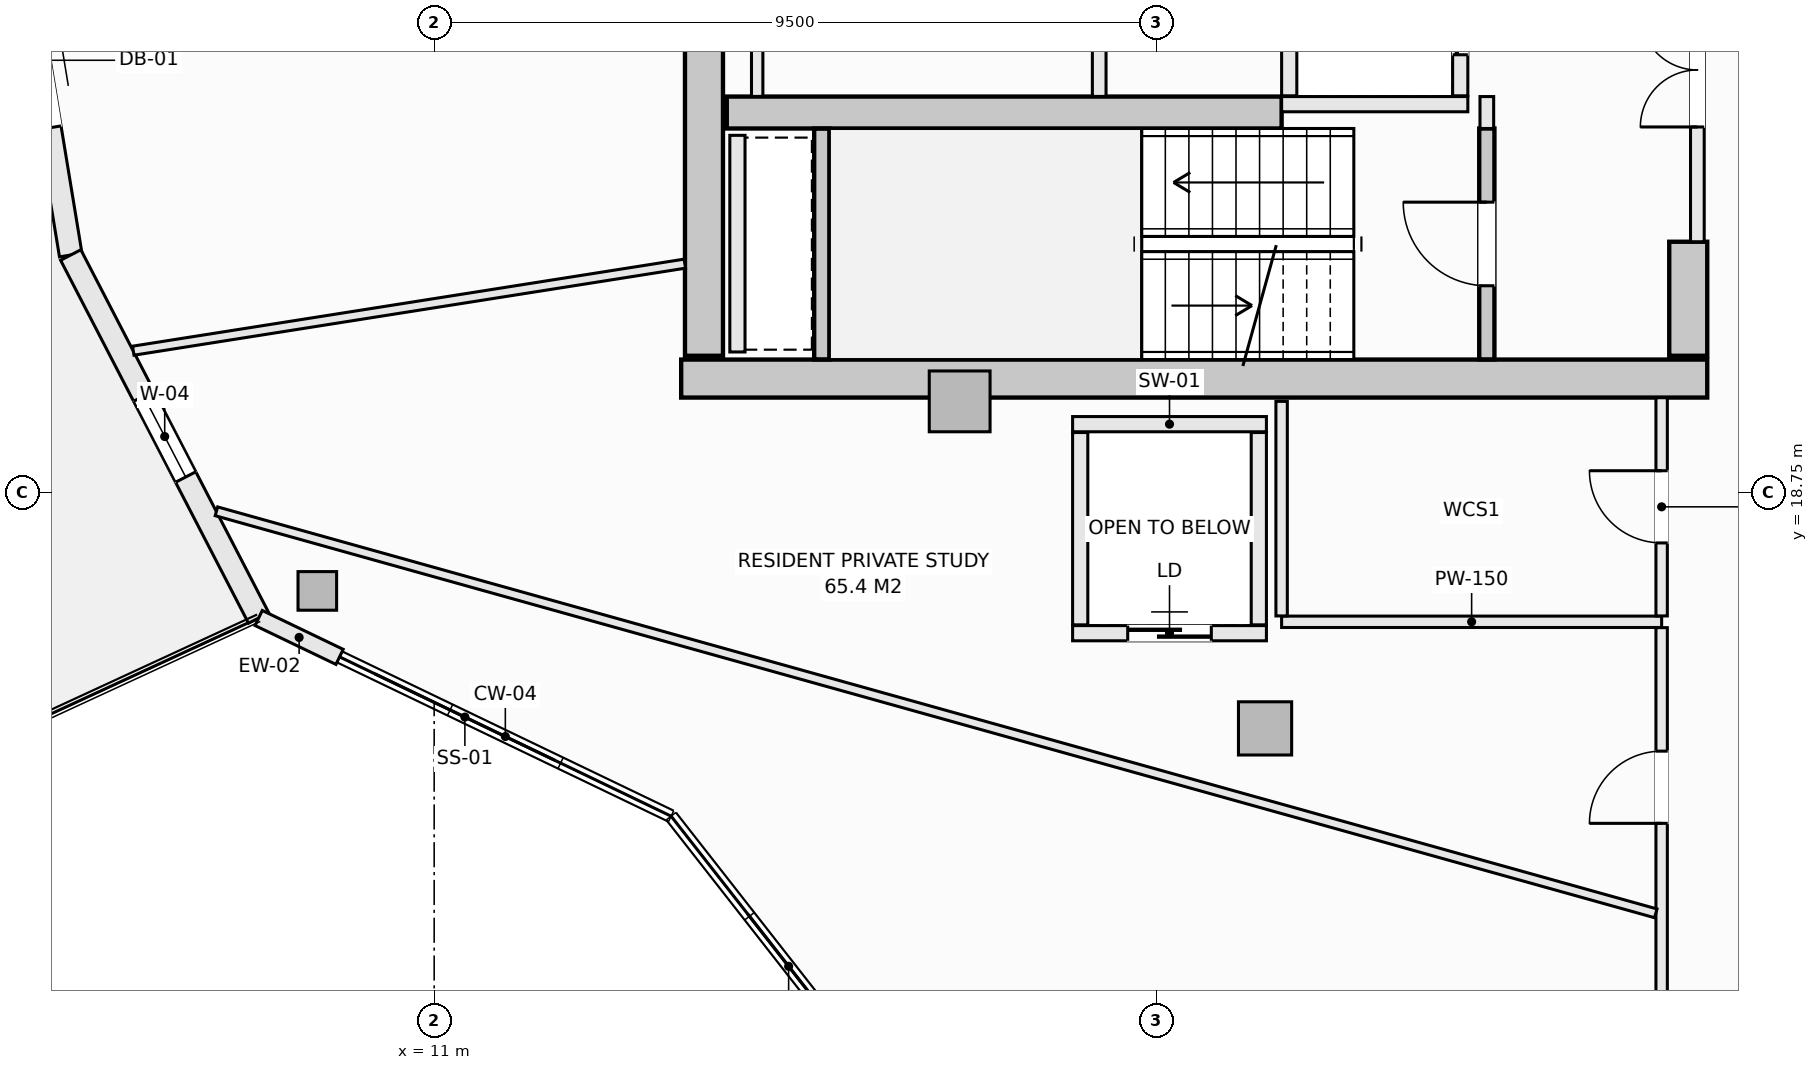
"""IFC4 building model, lengths in metres.
Left out: names, types, materials, properties, quantities, classifications, styles, units other than length and angle.
Written with IfcOpenShell. Run it as: python <this file> out.ifc"""

import sys

from ifc_helpers import new_model, si_unit, direction, frame, frame_2d, origin, origin_2d, place, context, subcontext, project, spatial, rectangle, hollow_rectangle, extrude, element, fill, save


model = new_model("IFC4")
c1 = context("Model", 3, precision=1e-05, world=origin(), true_north=direction((0.0, 1.0)))
c2 = subcontext(c1, "Body", "Model", "MODEL_VIEW")
j1 = project(units=[si_unit("LENGTHUNIT", "METRE"), si_unit("PLANEANGLEUNIT", "RADIAN")], contexts=[c1])
p1 = place(None, origin())
s1 = spatial("IfcSite", under=j1, at=p1, CompositionType="ELEMENT")
p2 = place(p1, origin())
s2 = spatial("IfcBuilding", under=s1, at=p2, CompositionType="ELEMENT")
p3 = place(p2, frame((0.0, 0.0, 219.5)))
s3 = spatial("IfcBuildingStorey", under=s2, at=p3, CompositionType="ELEMENT", Elevation=219.5)
p4 = place(p3, frame((14.25, 20.25, -0.27), z_axis=(0.0, 0.0, 1.0), x_axis=(1.0, 0.0, 0.0)))
e1 = element("IfcWall", 1, at=p4, inside=s3, PredefinedType="SHEAR", context=c2, shape_type="SweptSolid", body=[
    extrude(rectangle(XDim=13.5, YDim=0.5, at=frame_2d((6.75, 0.0))), origin(), (0.0, 0.0, 1.0), 3.3),
])
p5 = place(p3, frame((14.55, 20.55, -0.27), z_axis=(0.0, 0.0, 1.0), x_axis=(0.0, 1.0, 0.0)))
e2 = element("IfcWall", 2, at=p5, inside=s3, PredefinedType="SHEAR", context=c2, shape_type="SweptSolid", body=[
    extrude(rectangle(XDim=12.9, YDim=0.5, at=frame_2d((6.45, 0.0))), origin(), (0.0, 0.0, 1.0), 3.3),
])
p6 = place(p3, frame((27.5, 20.55, -0.27), z_axis=(0.0, 0.0, 1.0), x_axis=(0.0, 1.0, 0.0)))
e3 = element("IfcWall", 3, at=p6, inside=s3, PredefinedType="SHEAR", context=c2, shape_type="SweptSolid", body=[
    extrude(rectangle(XDim=1.5, YDim=0.5, at=frame_2d((0.75, 0.0))), origin(), (0.0, 0.0, 1.0), 3.3),
])
p7 = place(p3, frame((14.85, 23.75, -0.27), z_axis=(0.0, 0.0, 1.0), x_axis=(1.0, 0.0, 0.0)))
e4 = element("IfcWall", 4, at=p7, inside=s3, PredefinedType="SHEAR", context=c2, shape_type="SweptSolid", body=[
    extrude(rectangle(XDim=7.3, YDim=0.42, at=frame_2d((3.65, 0.0))), origin(), (0.0, 0.0, 1.0), 3.3),
])
p8 = place(p3, frame((9.463, 17.456, -0.27), z_axis=(0.0, 0.0, 1.0), x_axis=(1.0, 0.0, 0.0)))
e5 = element("IfcColumn", 5, at=p8, inside=s3, PredefinedType="COLUMN", context=c2, shape_type="SweptSolid", body=[
    extrude(hollow_rectangle(XDim=0.508, YDim=0.508, WallThickness=0.019, at=origin_2d()), origin(), (0.0, 0.0, 1.0), 3.3),
])
p9 = place(p3, frame((21.932, 15.648, -0.27), z_axis=(0.0, 0.0, 1.0), x_axis=(1.0, 0.0, 0.0)))
e6 = element("IfcColumn", 6, at=p9, inside=s3, PredefinedType="COLUMN", context=c2, shape_type="SweptSolid", body=[
    extrude(rectangle(XDim=0.7, YDim=0.7, at=origin_2d()), origin(), (0.0, 0.0, 1.0), 3.3),
])
p10 = place(p3, frame((17.914, 19.95, -0.27), z_axis=(0.0, 0.0, 1.0), x_axis=(1.0, 0.0, 0.0)))
e7 = element("IfcColumn", 7, at=p10, inside=s3, PredefinedType="PILASTER", context=c2, shape_type="SweptSolid", body=[
    extrude(rectangle(XDim=0.8, YDim=0.8, at=origin_2d()), origin(), (0.0, 0.0, 1.0), 3.3),
])
p11 = place(p3, frame((5.375, 27.0, 0.0), z_axis=(0.0, 0.0, 1.0), x_axis=(0.16237087798, -0.986729799886, 0.0)))
e8 = element("IfcWall", 8, at=p11, inside=s3, PredefinedType="SOLIDWALL", context=c2, shape_type="SweptSolid", body=[
    extrude(rectangle(XDim=5.193, YDim=0.3, at=frame_2d((2.597, 0.0))), origin(), (0.0, 0.0, 1.0), 2.605),
])
p12 = place(p11, frame((1.697, 0.0, 0.0)))
e9 = element("IfcOpeningElement", 9, at=p12, cuts=e8, PredefinedType="OPENING", context=c2, shape_type="SweptSolid", body=[
    extrude(rectangle(XDim=1.8, YDim=2.25, at=frame_2d((0.9, 1.125))), frame((0.0, 0.16, 0.0), z_axis=(0.0, -1.0, 0.0), x_axis=(1.0, 0.0, 0.0)), (0.0, 0.0, 1.0), 0.32),
])
p13 = place(p3, frame((6.218, 21.875, 0.0), z_axis=(0.0, 0.0, 1.0), x_axis=(0.459808219482, -0.888018243786, 0.0)))
e10 = element("IfcWall", 10, at=p13, inside=s3, PredefinedType="SOLIDWALL", context=c2, shape_type="SweptSolid", body=[
    extrude(rectangle(XDim=5.378, YDim=0.3, at=frame_2d((2.689, 0.0))), origin(), (0.0, 0.0, 1.0), 2.605),
])
p14 = place(p13, frame((2.089, 0.0, 0.72)))
e11 = element("IfcOpeningElement", 11, at=p14, cuts=e10, PredefinedType="OPENING", context=c2, shape_type="SweptSolid", body=[
    extrude(rectangle(XDim=1.2, YDim=1.65, at=frame_2d((0.6, 0.825))), frame((0.0, 0.16, 0.0), z_axis=(0.0, -1.0, 0.0), x_axis=(1.0, 0.0, 0.0)), (0.0, 0.0, 1.0), 0.32),
])
p15 = place(p3, frame((8.691, 17.1, 0.0), z_axis=(0.0, 0.0, 1.0), x_axis=(0.901264843027, -0.433268603437, 0.0)))
e12 = element("IfcWall", 12, at=p15, inside=s3, PredefinedType="SOLIDWALL", context=c2, shape_type="SweptSolid", body=[
    extrude(rectangle(XDim=1.181, YDim=0.22, at=frame_2d((0.591, 0.0))), origin(), (0.0, 0.0, 1.0), 2.605),
])
p16 = place(p3, frame((24.85, 20.502, -0.27), z_axis=(0.0, 0.0, 1.0), x_axis=(0.0, 1.0, 0.0)))
e13 = element("IfcWall", 13, at=p16, inside=s3, PredefinedType="SHEAR", context=c2, shape_type="SweptSolid", body=[
    extrude(rectangle(XDim=3.038, YDim=0.2, at=frame_2d((1.519, 0.0))), origin(), (0.0, 0.0, 1.0), 3.3),
])
p17 = place(p16, frame((0.969, 0.0, 0.27)))
e14 = element("IfcOpeningElement", 14, at=p17, cuts=e13, PredefinedType="OPENING", context=c2, shape_type="SweptSolid", body=[
    extrude(rectangle(XDim=1.1, YDim=2.15, at=frame_2d((0.55, 1.075))), frame((0.0, 0.11, 0.0), z_axis=(0.0, -1.0, 0.0), x_axis=(1.0, 0.0, 0.0)), (0.0, 0.0, 1.0), 0.22),
])
p18 = place(p3, frame((16.1, 20.502, -0.27), z_axis=(0.0, 0.0, 1.0), x_axis=(0.0, 1.0, 0.0)))
e15 = element("IfcWall", 15, at=p18, inside=s3, PredefinedType="SHEAR", context=c2, shape_type="SweptSolid", body=[
    extrude(rectangle(XDim=3.036, YDim=0.2, at=frame_2d((1.518, 0.0))), origin(), (0.0, 0.0, 1.0), 3.3),
])
p19 = place(p3, frame((22.15, 23.86, 0.0), z_axis=(0.0, 0.0, 1.0), x_axis=(1.0, 0.0, 0.0)))
e16 = element("IfcWall", 16, at=p19, inside=s3, PredefinedType="SOLIDWALL", context=c2, shape_type="SweptSolid", body=[
    extrude(rectangle(XDim=2.45, YDim=0.2, at=frame_2d((1.225, 0.0))), origin(), (0.0, 0.0, 1.0), 3.03),
])
p20 = place(p3, frame((22.25, 23.97, 0.0), z_axis=(0.0, 0.0, 1.0), x_axis=(0.0, 1.0, 0.0)))
e17 = element("IfcWall", 17, at=p20, inside=s3, PredefinedType="SOLIDWALL", context=c2, shape_type="SweptSolid", body=[
    extrude(rectangle(XDim=2.18, YDim=0.2, at=frame_2d((1.09, 0.0))), origin(), (0.0, 0.0, 1.0), 3.03),
])
p21 = place(p3, frame((24.5, 23.97, 0.0), z_axis=(0.0, 0.0, 1.0), x_axis=(0.0, 1.0, 0.0)))
e18 = element("IfcWall", 18, at=p21, inside=s3, PredefinedType="SOLIDWALL", context=c2, shape_type="SweptSolid", body=[
    extrude(rectangle(XDim=2.18, YDim=0.2, at=frame_2d((1.09, 0.0))), origin(), (0.0, 0.0, 1.0), 3.03),
])
p22 = place(p21, frame((0.54, 0.0, 0.0)))
e19 = element("IfcOpeningElement", 19, at=p22, cuts=e18, PredefinedType="OPENING", context=c2, shape_type="SweptSolid", body=[
    extrude(rectangle(XDim=1.1, YDim=2.2, at=frame_2d((0.55, 1.1))), frame((0.0, 0.11, 0.0), z_axis=(0.0, -1.0, 0.0), x_axis=(1.0, 0.0, 0.0)), (0.0, 0.0, 1.0), 0.22),
])
p23 = place(p3, frame((19.4, 19.65, 0.0), z_axis=(0.0, 0.0, 1.0), x_axis=(1.0, 0.0, 0.0)))
e20 = element("IfcWall", 20, at=p23, inside=s3, PredefinedType="SOLIDWALL", context=c2, shape_type="SweptSolid", body=[
    extrude(rectangle(XDim=2.55, YDim=0.2, at=frame_2d((1.275, 0.0))), origin(), (0.0, 0.0, 1.0), 3.03),
])
p24 = place(p3, frame((19.4, 16.9, 0.0), z_axis=(0.0, 0.0, 1.0), x_axis=(1.0, 0.0, 0.0)))
e21 = element("IfcWall", 21, at=p24, inside=s3, PredefinedType="SOLIDWALL", context=c2, shape_type="SweptSolid", body=[
    extrude(rectangle(XDim=2.55, YDim=0.2, at=frame_2d((1.275, 0.0))), origin(), (0.0, 0.0, 1.0), 3.03),
])
p25 = place(p24, frame((0.725, 0.0, 0.0)))
e22 = element("IfcOpeningElement", 22, at=p25, cuts=e21, PredefinedType="OPENING", context=c2, shape_type="SweptSolid", body=[
    extrude(rectangle(XDim=1.1, YDim=2.2, at=frame_2d((0.55, 1.1))), frame((0.0, 0.11, 0.0), z_axis=(0.0, -1.0, 0.0), x_axis=(1.0, 0.0, 0.0)), (0.0, 0.0, 1.0), 0.22),
])
for number, where, z_axis, x_axis in (
    (23, (19.5, 17.01, 0.0), (0.0, 0.0, 1.0), (0.0, 1.0, 0.0)),
    (24, (21.85, 17.01, 0.0), (0.0, 0.0, 1.0), (0.0, 1.0, 0.0)),
):
    element("IfcWall", number, at=place(p3, frame(where, z_axis=z_axis, x_axis=x_axis)), inside=s3, PredefinedType="SOLIDWALL", context=c2, shape_type="SweptSolid", body=[
        extrude(rectangle(XDim=2.53, YDim=0.2, at=frame_2d((1.265, 0.0))), origin(), (0.0, 0.0, 1.0), 3.03),
    ])
p26 = place(p3, frame((14.99, 20.6, 0.0), z_axis=(0.0, 0.0, 1.0), x_axis=(0.0, 1.0, 0.0)))
e25 = element("IfcWall", 25, at=p26, inside=s3, PredefinedType="SOLIDWALL", context=c2, shape_type="SweptSolid", body=[
    extrude(rectangle(XDim=2.85, YDim=0.2, at=frame_2d((1.425, 0.0))), origin(), (0.0, 0.0, 1.0), 3.03),
])
p27 = place(p3, frame((24.85, 23.54, 0.0), z_axis=(0.0, 0.0, 1.0), x_axis=(0.0, 1.0, 0.0)))
e26 = element("IfcWall", 26, at=p27, inside=s3, PredefinedType="SOLIDWALL", context=c2, shape_type="SweptSolid", body=[
    extrude(rectangle(XDim=0.42, YDim=0.18, at=frame_2d((0.21, 0.0))), origin(), (0.0, 0.0, 1.0), 3.03),
])
p28 = place(p3, frame((27.62, 22.05, 0.0), z_axis=(0.0, 0.0, 1.0), x_axis=(0.0, 1.0, 0.0)))
e27 = element("IfcWall", 27, at=p28, inside=s3, PredefinedType="SOLIDWALL", context=c2, shape_type="SweptSolid", body=[
    extrude(rectangle(XDim=9.9, YDim=0.18, at=frame_2d((4.95, 0.0))), origin(), (0.0, 0.0, 1.0), 3.03),
])
p29 = place(p28, frame((4.475, 0.0, 0.0)))
e28 = element("IfcOpeningElement", 28, at=p29, cuts=e27, PredefinedType="OPENING", context=c2, shape_type="SweptSolid", body=[
    extrude(rectangle(XDim=0.95, YDim=2.1, at=frame_2d((0.475, 1.05))), frame((0.0, 0.1, 0.0), z_axis=(0.0, -1.0, 0.0), x_axis=(1.0, 0.0, 0.0)), (0.0, 0.0, 1.0), 0.2),
])
p30 = place(p28, frame((6.89, 0.0, 0.0)))
e29 = element("IfcOpeningElement", 29, at=p30, cuts=e27, PredefinedType="OPENING", context=c2, shape_type="SweptSolid", body=[
    extrude(rectangle(XDim=1.5, YDim=2.2, at=frame_2d((0.75, 1.1))), frame((0.0, 0.1, 0.0), z_axis=(0.0, -1.0, 0.0), x_axis=(1.0, 0.0, 0.0)), (0.0, 0.0, 1.0), 0.2),
])
p31 = place(p28, frame((1.51, 0.0, 0.0)))
e30 = element("IfcOpeningElement", 30, at=p31, cuts=e27, PredefinedType="OPENING", context=c2, shape_type="SweptSolid", body=[
    extrude(rectangle(XDim=1.5, YDim=2.2, at=frame_2d((0.75, 1.1))), frame((0.0, 0.1, 0.0), z_axis=(0.0, -1.0, 0.0), x_axis=(1.0, 0.0, 0.0)), (0.0, 0.0, 1.0), 0.2),
])
p32 = place(p3, frame((15.25, 23.962, 0.0), z_axis=(0.0, 0.0, 1.0), x_axis=(0.0, 1.0, 0.0)))
e31 = element("IfcWall", 31, at=p32, inside=s3, PredefinedType="PARTITIONING", context=c2, shape_type="SweptSolid", body=[
    extrude(rectangle(XDim=2.106, YDim=0.15, at=frame_2d((1.053, 0.0))), origin(), (0.0, 0.0, 1.0), 3.03),
])
p33 = place(p3, frame((19.75, 23.962, 0.0), z_axis=(0.0, 0.0, 1.0), x_axis=(0.0, 1.0, 0.0)))
e32 = element("IfcWall", 32, at=p33, inside=s3, PredefinedType="SOLIDWALL", context=c2, shape_type="SweptSolid", body=[
    extrude(rectangle(XDim=2.106, YDim=0.18, at=frame_2d((1.053, 0.0))), origin(), (0.0, 0.0, 1.0), 3.03),
])
p34 = place(p3, frame((22.15, 17.05, 0.0), z_axis=(0.0, 0.0, 1.0), x_axis=(1.0, 0.0, 0.0)))
e33 = element("IfcWall", 33, at=p34, inside=s3, PredefinedType="PARTITIONING", context=c2, shape_type="SweptSolid", body=[
    extrude(rectangle(XDim=5.0, YDim=0.15, at=frame_2d((2.5, 0.0))), origin(), (0.0, 0.0, 1.0), 3.03),
])
p35 = place(p3, frame((22.15, 17.127, 0.0), z_axis=(0.0, 0.0, 1.0), x_axis=(0.0, 1.0, 0.0)))
e34 = element("IfcWall", 34, at=p35, inside=s3, PredefinedType="PARTITIONING", context=c2, shape_type="SweptSolid", body=[
    extrude(rectangle(XDim=2.823, YDim=0.15, at=frame_2d((1.412, 0.0))), origin(), (0.0, 0.0, 1.0), 3.03),
])
p36 = place(p3, frame((27.15, 11.75, 0.0), z_axis=(0.0, 0.0, 1.0), x_axis=(0.0, 1.0, 0.0)))
e35 = element("IfcWall", 35, at=p36, inside=s3, PredefinedType="PARTITIONING", context=c2, shape_type="SweptSolid", body=[
    extrude(rectangle(XDim=5.223, YDim=0.15, at=frame_2d((2.611, 0.0))), origin(), (0.0, 0.0, 1.0), 3.03),
])
p37 = place(p36, frame((2.648, 0.0, 0.0)))
e36 = element("IfcOpeningElement", 36, at=p37, cuts=e35, PredefinedType="OPENING", context=c2, shape_type="SweptSolid", body=[
    extrude(rectangle(XDim=0.95, YDim=2.1, at=frame_2d((0.475, 1.05))), frame((0.0, 0.085, 0.0), z_axis=(0.0, -1.0, 0.0), x_axis=(1.0, 0.0, 0.0)), (0.0, 0.0, 1.0), 0.17),
])
p38 = place(p3, frame((27.15, 17.127, 0.0), z_axis=(0.0, 0.0, 1.0), x_axis=(0.0, 1.0, 0.0)))
e37 = element("IfcWall", 37, at=p38, inside=s3, PredefinedType="PARTITIONING", context=c2, shape_type="SweptSolid", body=[
    extrude(rectangle(XDim=2.871, YDim=0.15, at=frame_2d((1.436, 0.0))), origin(), (0.0, 0.0, 1.0), 3.03),
])
p39 = place(p38, frame((0.96, 0.0, 0.0)))
e38 = element("IfcOpeningElement", 38, at=p39, cuts=e37, PredefinedType="OPENING", context=c2, shape_type="SweptSolid", body=[
    extrude(rectangle(XDim=0.95, YDim=2.1, at=frame_2d((0.475, 1.05))), frame((0.0, 0.085, 0.0), z_axis=(0.0, -1.0, 0.0), x_axis=(1.0, 0.0, 0.0)), (0.0, 0.0, 1.0), 0.17),
])
p40 = place(p3, frame((7.041, 20.617, 0.0), z_axis=(0.0, 0.0, 1.0), x_axis=(0.987780472541, 0.155851654036, 0.0)))
e39 = element("IfcWall", 39, at=p40, inside=s3, PredefinedType="PARTITIONING", context=c2, shape_type="SweptSolid", body=[
    extrude(rectangle(XDim=7.347, YDim=0.12, at=frame_2d((3.673, 0.0))), origin(), (0.0, 0.0, 1.0), 3.03),
])
p41 = place(p3, frame((8.135, 18.504, 0.0), z_axis=(0.0, 0.0, 1.0), x_axis=(0.963142154711, -0.268992917785, 0.0)))
e40 = element("IfcWall", 40, at=p41, inside=s3, PredefinedType="PARTITIONING", context=c2, shape_type="SweptSolid", body=[
    extrude(rectangle(XDim=19.662, YDim=0.12, at=frame_2d((9.831, 0.0))), origin(), (0.0, 0.0, 1.0), 2.77),
])
p42 = place(p12, frame((1.8, 0.0, 0.0), z_axis=(0.0, 0.0, 1.0), x_axis=(-1.0, 0.0, 0.0)))
e41 = element("IfcDoor", 41, at=p42, inside=s3, OperationType="SLIDING_TO_LEFT", PredefinedType="DOOR", context=c2, shape_type="SweptSolid", body=[
    extrude(rectangle(XDim=1.8, YDim=2.25, at=frame_2d((0.9, 1.125))), frame((0.0, 0.025, 0.0), z_axis=(0.0, -1.0, 0.0), x_axis=(1.0, 0.0, 0.0)), (0.0, 0.0, 1.0), 0.05),
])
fill(e9, e41)
p43 = place(p14, origin())
e42 = element("IfcWindow", 42, at=p43, inside=s3, PartitioningType="SINGLE_PANEL", PredefinedType="WINDOW", context=c2, shape_type="SweptSolid", body=[
    extrude(rectangle(XDim=1.2, YDim=1.65, at=frame_2d((0.6, 0.825))), frame((0.0, 0.03, 0.0), z_axis=(0.0, -1.0, 0.0), x_axis=(1.0, 0.0, 0.0)), (0.0, 0.0, 1.0), 0.06),
])
fill(e11, e42)
p44 = place(p17, origin())
e43 = element("IfcDoor", 43, at=p44, inside=s3, OperationType="SINGLE_SWING_RIGHT", PredefinedType="DOOR", context=c2, shape_type="SweptSolid", body=[
    extrude(rectangle(XDim=1.1, YDim=2.15, at=frame_2d((0.55, 1.075))), frame((0.0, 0.025, 0.0), z_axis=(0.0, -1.0, 0.0), x_axis=(1.0, 0.0, 0.0)), (0.0, 0.0, 1.0), 0.05),
])
fill(e14, e43)
p45 = place(p22, origin())
e44 = element("IfcDoor", 44, at=p45, inside=s3, OperationType="SLIDING_TO_LEFT", PredefinedType="DOOR", context=c2, shape_type="SweptSolid", body=[
    extrude(rectangle(XDim=1.1, YDim=2.2, at=frame_2d((0.55, 1.1))), frame((0.0, 0.025, 0.0), z_axis=(0.0, -1.0, 0.0), x_axis=(1.0, 0.0, 0.0)), (0.0, 0.0, 1.0), 0.05),
])
fill(e19, e44)
p46 = place(p25, origin())
e45 = element("IfcDoor", 45, at=p46, inside=s3, OperationType="SLIDING_TO_LEFT", PredefinedType="DOOR", context=c2, shape_type="SweptSolid", body=[
    extrude(rectangle(XDim=1.1, YDim=2.2, at=frame_2d((0.55, 1.1))), frame((0.0, 0.025, 0.0), z_axis=(0.0, -1.0, 0.0), x_axis=(1.0, 0.0, 0.0)), (0.0, 0.0, 1.0), 0.05),
])
fill(e22, e45)
p47 = place(p31, origin())
e46 = element("IfcDoor", 46, at=p47, inside=s3, OperationType="DOUBLE_DOOR_SINGLE_SWING", PredefinedType="DOOR", context=c2, shape_type="SweptSolid", body=[
    extrude(rectangle(XDim=1.5, YDim=2.2, at=frame_2d((0.75, 1.1))), frame((0.0, 0.025, 0.0), z_axis=(0.0, -1.0, 0.0), x_axis=(1.0, 0.0, 0.0)), (0.0, 0.0, 1.0), 0.05),
])
fill(e30, e46)
p48 = place(p39, origin())
e47 = element("IfcDoor", 47, at=p48, inside=s3, OperationType="SINGLE_SWING_RIGHT", PredefinedType="DOOR", context=c2, shape_type="SweptSolid", body=[
    extrude(rectangle(XDim=0.95, YDim=2.1, at=frame_2d((0.475, 1.05))), frame((0.0, 0.025, 0.0), z_axis=(0.0, -1.0, 0.0), x_axis=(1.0, 0.0, 0.0)), (0.0, 0.0, 1.0), 0.05),
])
fill(e38, e47)
p49 = place(p37, origin())
e48 = element("IfcDoor", 48, at=p49, inside=s3, OperationType="SINGLE_SWING_LEFT", PredefinedType="DOOR", context=c2, shape_type="SweptSolid", body=[
    extrude(rectangle(XDim=0.95, YDim=2.1, at=frame_2d((0.475, 1.05))), frame((0.0, 0.025, 0.0), z_axis=(0.0, -1.0, 0.0), x_axis=(1.0, 0.0, 0.0)), (0.0, 0.0, 1.0), 0.05),
])
fill(e36, e48)
save(model, sys.argv[1])
